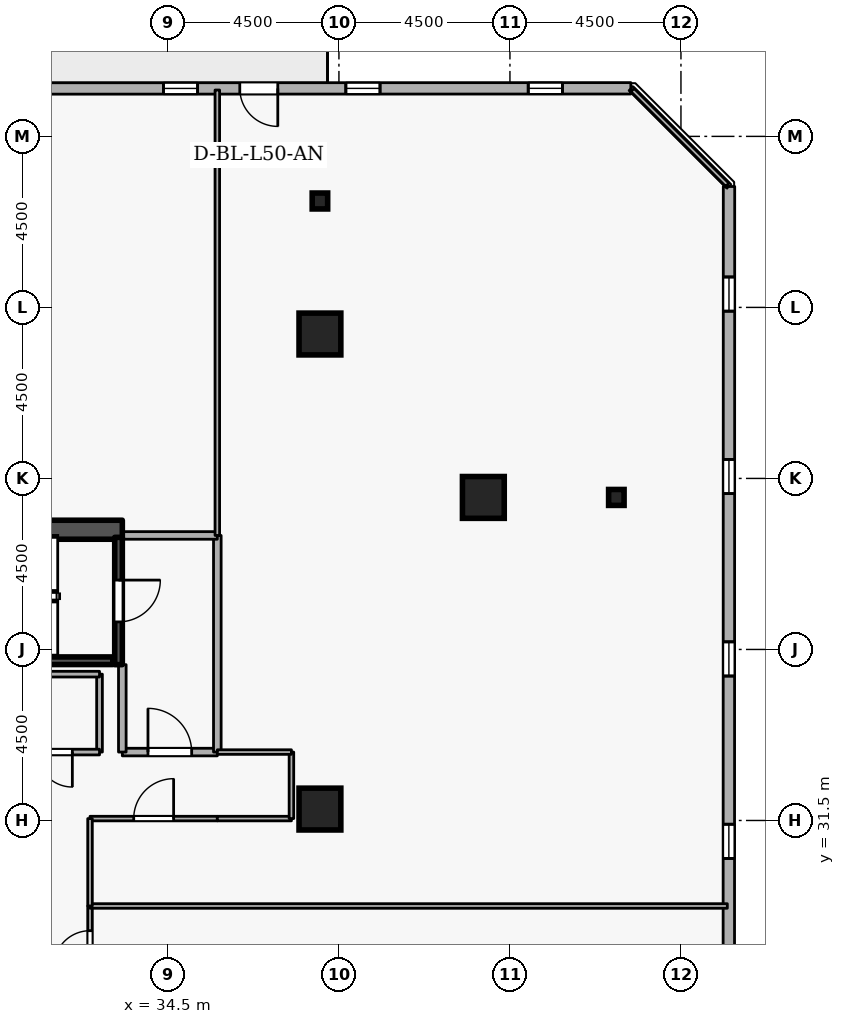
"""IFC4 building model, lengths in metres.
Left out: names, types, materials, properties, quantities, classifications, styles, units other than length and angle.
Written with IfcOpenShell. Run it as: python <this file> out.ifc"""

import sys

from ifc_helpers import new_model, si_unit, direction, frame, frame_2d, origin, origin_2d, place, context, subcontext, project, spatial, rectangle, i_section, extrude, element, fill, save


model = new_model("IFC4")
c1 = context("Model", 3, precision=1e-05, world=origin(), true_north=direction((0.0, 1.0)))
c2 = subcontext(c1, "Body", "Model", "MODEL_VIEW")
j1 = project(units=[si_unit("LENGTHUNIT", "METRE"), si_unit("PLANEANGLEUNIT", "RADIAN")], contexts=[c1])
p1 = place(None, origin())
s1 = spatial("IfcSite", under=j1, at=p1, CompositionType="ELEMENT")
p2 = place(p1, origin())
s2 = spatial("IfcBuilding", under=s1, at=p2, CompositionType="ELEMENT")
p3 = place(p2, frame((0.0, 0.0, 189.3)))
s3 = spatial("IfcBuildingStorey", under=s2, at=p3, CompositionType="ELEMENT", Elevation=189.3)
p4 = place(p3, frame((17.7, 39.15, 0.0), z_axis=(0.0, 0.0, 1.0), x_axis=(1.0, 0.0, 0.0)))
e1 = element("IfcWall", 1, at=p4, inside=s3, PredefinedType="SHEAR", context=c2, shape_type="SweptSolid", body=[
    extrude(rectangle(XDim=15.6, YDim=0.5, at=frame_2d((7.8, 0.0))), origin(), (0.0, 0.0, 1.0), 3.6),
])
for number, where, z_axis, x_axis in (
    (2, (42.8, 40.0, 0.0), (0.0, 0.0, 1.0), (1.0, 0.0, 0.0)),
    (3, (38.5, 44.3, 0.0), (0.0, 0.0, 1.0), (1.0, 0.0, 0.0)),
    (4, (38.5, 31.8, 0.0), (0.0, 0.0, 1.0), (1.0, 0.0, 0.0)),
):
    element("IfcColumn", number, at=place(p3, frame(where, z_axis=z_axis, x_axis=x_axis)), inside=s3, PredefinedType="COLUMN", context=c2, shape_type="SweptSolid", body=[
        extrude(rectangle(XDim=1.1, YDim=1.1, at=origin_2d()), origin(), (0.0, 0.0, 1.0), 3.6),
    ])
for number, where, z_axis, x_axis in (
    (5, (46.3, 40.0, 0.0), (0.0, 0.0, 1.0), (1.0, 0.0, 0.0)),
    (6, (38.5, 47.8, 0.0), (0.0, 0.0, 1.0), (1.0, 0.0, 0.0)),
):
    element("IfcColumn", number, at=place(p3, frame(where, z_axis=z_axis, x_axis=x_axis)), inside=s3, PredefinedType="COLUMN", context=c2, shape_type="SweptSolid", body=[
        extrude(i_section(OverallWidth=0.407, OverallDepth=0.419, WebThickness=0.031, FlangeThickness=0.049, FilletRadius=0.015, at=origin_2d()), origin(), (0.0, 0.0, 1.0), 3.6),
    ])
p5 = place(p3, frame((49.256, 14.301, 0.0), z_axis=(0.0, 0.0, 1.0), x_axis=(0.000244999128, 0.999999969988, 0.0)))
e7 = element("IfcWall", 7, at=p5, inside=s3, PredefinedType="STANDARD", context=c2, shape_type="SweptSolid", body=[
    extrude(rectangle(XDim=33.881, YDim=0.3, at=frame_2d((16.94, 0.0))), origin(), (0.0, 0.0, 1.0), 2.7),
])
p6 = place(p5, frame((1.8, 0.0, 0.72)))
e8 = element("IfcOpeningElement", 8, at=p6, cuts=e7, PredefinedType="OPENING", context=c2, shape_type="SweptSolid", body=[
    extrude(rectangle(XDim=0.9, YDim=1.75, at=frame_2d((0.45, 0.875))), frame((0.0, 0.16, 0.0), z_axis=(0.0, -1.0, 0.0), x_axis=(1.0, 0.0, 0.0)), (0.0, 0.0, 1.0), 0.32),
])
p7 = place(p5, frame((6.6, 0.0, 0.72)))
e9 = element("IfcOpeningElement", 9, at=p7, cuts=e7, PredefinedType="OPENING", context=c2, shape_type="SweptSolid", body=[
    extrude(rectangle(XDim=0.9, YDim=1.75, at=frame_2d((0.45, 0.875))), frame((0.0, 0.16, 0.0), z_axis=(0.0, -1.0, 0.0), x_axis=(1.0, 0.0, 0.0)), (0.0, 0.0, 1.0), 0.32),
])
p8 = place(p5, frame((11.4, 0.0, 0.72)))
e10 = element("IfcOpeningElement", 10, at=p8, cuts=e7, PredefinedType="OPENING", context=c2, shape_type="SweptSolid", body=[
    extrude(rectangle(XDim=0.9, YDim=1.75, at=frame_2d((0.45, 0.875))), frame((0.0, 0.16, 0.0), z_axis=(0.0, -1.0, 0.0), x_axis=(1.0, 0.0, 0.0)), (0.0, 0.0, 1.0), 0.32),
])
p9 = place(p5, frame((16.2, 0.0, 0.72)))
e11 = element("IfcOpeningElement", 11, at=p9, cuts=e7, PredefinedType="OPENING", context=c2, shape_type="SweptSolid", body=[
    extrude(rectangle(XDim=0.9, YDim=1.75, at=frame_2d((0.45, 0.875))), frame((0.0, 0.16, 0.0), z_axis=(0.0, -1.0, 0.0), x_axis=(1.0, 0.0, 0.0)), (0.0, 0.0, 1.0), 0.32),
])
p10 = place(p5, frame((21.0, 0.0, 0.72)))
e12 = element("IfcOpeningElement", 12, at=p10, cuts=e7, PredefinedType="OPENING", context=c2, shape_type="SweptSolid", body=[
    extrude(rectangle(XDim=0.9, YDim=1.75, at=frame_2d((0.45, 0.875))), frame((0.0, 0.16, 0.0), z_axis=(0.0, -1.0, 0.0), x_axis=(1.0, 0.0, 0.0)), (0.0, 0.0, 1.0), 0.32),
])
p11 = place(p5, frame((25.8, 0.0, 0.72)))
e13 = element("IfcOpeningElement", 13, at=p11, cuts=e7, PredefinedType="OPENING", context=c2, shape_type="SweptSolid", body=[
    extrude(rectangle(XDim=0.9, YDim=1.75, at=frame_2d((0.45, 0.875))), frame((0.0, 0.16, 0.0), z_axis=(0.0, -1.0, 0.0), x_axis=(1.0, 0.0, 0.0)), (0.0, 0.0, 1.0), 0.32),
])
p12 = place(p5, frame((30.6, 0.0, 0.72)))
e14 = element("IfcOpeningElement", 14, at=p12, cuts=e7, PredefinedType="OPENING", context=c2, shape_type="SweptSolid", body=[
    extrude(rectangle(XDim=0.9, YDim=1.75, at=frame_2d((0.45, 0.875))), frame((0.0, 0.16, 0.0), z_axis=(0.0, -1.0, 0.0), x_axis=(1.0, 0.0, 0.0)), (0.0, 0.0, 1.0), 0.32),
])
p13 = place(p3, frame((46.681, 50.765, 0.0), z_axis=(0.0, 0.0, 1.0), x_axis=(-0.999999969988, -0.000244999128, 0.0)))
e15 = element("IfcWall", 15, at=p13, inside=s3, PredefinedType="STANDARD", context=c2, shape_type="SweptSolid", body=[
    extrude(rectangle(XDim=33.881, YDim=0.3, at=frame_2d((16.94, 0.0))), origin(), (0.0, 0.0, 1.0), 2.7),
])
p14 = place(p13, frame((9.29, 0.0, 0.0)))
e16 = element("IfcOpeningElement", 16, at=p14, cuts=e15, PredefinedType="OPENING", context=c2, shape_type="SweptSolid", body=[
    extrude(rectangle(XDim=1.0, YDim=2.08, at=frame_2d((0.5, 1.04))), frame((0.0, 0.16, 0.0), z_axis=(0.0, -1.0, 0.0), x_axis=(1.0, 0.0, 0.0)), (0.0, 0.0, 1.0), 0.32),
])
p15 = place(p13, frame((1.8, 0.0, 0.72)))
e17 = element("IfcOpeningElement", 17, at=p15, cuts=e15, PredefinedType="OPENING", context=c2, shape_type="SweptSolid", body=[
    extrude(rectangle(XDim=0.9, YDim=1.75, at=frame_2d((0.45, 0.875))), frame((0.0, 0.16, 0.0), z_axis=(0.0, -1.0, 0.0), x_axis=(1.0, 0.0, 0.0)), (0.0, 0.0, 1.0), 0.32),
])
p16 = place(p13, frame((6.6, 0.0, 0.72)))
e18 = element("IfcOpeningElement", 18, at=p16, cuts=e15, PredefinedType="OPENING", context=c2, shape_type="SweptSolid", body=[
    extrude(rectangle(XDim=0.9, YDim=1.75, at=frame_2d((0.45, 0.875))), frame((0.0, 0.16, 0.0), z_axis=(0.0, -1.0, 0.0), x_axis=(1.0, 0.0, 0.0)), (0.0, 0.0, 1.0), 0.32),
])
p17 = place(p13, frame((11.4, 0.0, 0.72)))
e19 = element("IfcOpeningElement", 19, at=p17, cuts=e15, PredefinedType="OPENING", context=c2, shape_type="SweptSolid", body=[
    extrude(rectangle(XDim=0.9, YDim=1.75, at=frame_2d((0.45, 0.875))), frame((0.0, 0.16, 0.0), z_axis=(0.0, -1.0, 0.0), x_axis=(1.0, 0.0, 0.0)), (0.0, 0.0, 1.0), 0.32),
])
p18 = place(p13, frame((16.2, 0.0, 0.72)))
e20 = element("IfcOpeningElement", 20, at=p18, cuts=e15, PredefinedType="OPENING", context=c2, shape_type="SweptSolid", body=[
    extrude(rectangle(XDim=0.9, YDim=1.75, at=frame_2d((0.45, 0.875))), frame((0.0, 0.16, 0.0), z_axis=(0.0, -1.0, 0.0), x_axis=(1.0, 0.0, 0.0)), (0.0, 0.0, 1.0), 0.32),
])
p19 = place(p13, frame((21.0, 0.0, 0.72)))
e21 = element("IfcOpeningElement", 21, at=p19, cuts=e15, PredefinedType="OPENING", context=c2, shape_type="SweptSolid", body=[
    extrude(rectangle(XDim=0.9, YDim=1.75, at=frame_2d((0.45, 0.875))), frame((0.0, 0.16, 0.0), z_axis=(0.0, -1.0, 0.0), x_axis=(1.0, 0.0, 0.0)), (0.0, 0.0, 1.0), 0.32),
])
p20 = place(p13, frame((25.8, 0.0, 0.72)))
e22 = element("IfcOpeningElement", 22, at=p20, cuts=e15, PredefinedType="OPENING", context=c2, shape_type="SweptSolid", body=[
    extrude(rectangle(XDim=0.9, YDim=1.75, at=frame_2d((0.45, 0.875))), frame((0.0, 0.16, 0.0), z_axis=(0.0, -1.0, 0.0), x_axis=(1.0, 0.0, 0.0)), (0.0, 0.0, 1.0), 0.32),
])
p21 = place(p13, frame((30.6, 0.0, 0.72)))
e23 = element("IfcOpeningElement", 23, at=p21, cuts=e15, PredefinedType="OPENING", context=c2, shape_type="SweptSolid", body=[
    extrude(rectangle(XDim=0.9, YDim=1.75, at=frame_2d((0.45, 0.875))), frame((0.0, 0.16, 0.0), z_axis=(0.0, -1.0, 0.0), x_axis=(1.0, 0.0, 0.0)), (0.0, 0.0, 1.0), 0.32),
])
p22 = place(p3, frame((33.2, 38.95, 0.0), z_axis=(0.0, 0.0, 1.0), x_axis=(0.0, -1.0, 0.0)))
e24 = element("IfcWall", 24, at=p22, inside=s3, PredefinedType="SHEAR", context=c2, shape_type="SweptSolid", body=[
    extrude(rectangle(XDim=3.35, YDim=0.2, at=frame_2d((1.675, 0.0))), origin(), (0.0, 0.0, 1.0), 3.6),
])
p23 = place(p22, frame((1.125, 0.0, 0.0)))
e25 = element("IfcOpeningElement", 25, at=p23, cuts=e24, PredefinedType="OPENING", context=c2, shape_type="SweptSolid", body=[
    extrude(rectangle(XDim=1.1, YDim=2.1, at=frame_2d((0.55, 1.05))), frame((0.0, 0.11, 0.0), z_axis=(0.0, -1.0, 0.0), x_axis=(1.0, 0.0, 0.0)), (0.0, 0.0, 1.0), 0.22),
])
p24 = place(p3, frame((25.95, 35.703, 0.0), z_axis=(0.0, 0.0, 1.0), x_axis=(1.0, 0.0, 0.0)))
e26 = element("IfcWall", 26, at=p24, inside=s3, PredefinedType="SHEAR", context=c2, shape_type="SweptSolid", body=[
    extrude(rectangle(XDim=7.1, YDim=0.2, at=frame_2d((3.55, 0.0))), origin(), (0.0, 0.0, 1.0), 3.6),
])
p25 = place(p3, frame((33.3, 33.3, 0.0), z_axis=(0.0, 0.0, 1.0), x_axis=(1.0, 0.0, 0.0)))
e27 = element("IfcWall", 27, at=p25, inside=s3, PredefinedType="STANDARD", context=c2, shape_type="SweptSolid", body=[
    extrude(rectangle(XDim=2.5, YDim=0.2, at=frame_2d((1.25, 0.0))), origin(), (0.0, 0.0, 1.0), 3.34),
])
p26 = place(p25, frame((0.675, 0.0, 0.0)))
e28 = element("IfcOpeningElement", 28, at=p26, cuts=e27, PredefinedType="OPENING", context=c2, shape_type="SweptSolid", body=[
    extrude(rectangle(XDim=1.15, YDim=2.1, at=frame_2d((0.575, 1.05))), frame((0.0, 0.11, 0.0), z_axis=(0.0, -1.0, 0.0), x_axis=(1.0, 0.0, 0.0)), (0.0, 0.0, 1.0), 0.22),
])
p27 = place(p3, frame((35.8, 33.3, 0.0), z_axis=(0.0, 0.0, 1.0), x_axis=(0.0, 1.0, 0.0)))
e29 = element("IfcWall", 29, at=p27, inside=s3, PredefinedType="STANDARD", context=c2, shape_type="SweptSolid", body=[
    extrude(rectangle(XDim=5.7, YDim=0.2, at=frame_2d((2.85, 0.0))), origin(), (0.0, 0.0, 1.0), 3.34),
])
p28 = place(p3, frame((35.8, 39.0, 0.0), z_axis=(0.0, 0.0, 1.0), x_axis=(-1.0, 0.0, 0.0)))
e30 = element("IfcWall", 30, at=p28, inside=s3, PredefinedType="STANDARD", context=c2, shape_type="SweptSolid", body=[
    extrude(rectangle(XDim=2.5, YDim=0.2, at=frame_2d((1.25, 0.0))), origin(), (0.0, 0.0, 1.0), 3.34),
])
p29 = place(p3, frame((33.3, 35.6, 0.0), z_axis=(0.0, 0.0, 1.0), x_axis=(0.0, -1.0, 0.0)))
e31 = element("IfcWall", 31, at=p29, inside=s3, PredefinedType="STANDARD", context=c2, shape_type="SweptSolid", body=[
    extrude(rectangle(XDim=2.3, YDim=0.2, at=frame_2d((1.15, 0.0))), origin(), (0.0, 0.0, 1.0), 2.545),
])
p30 = place(p3, frame((32.7, 35.35, 0.0), z_axis=(0.0, 0.0, 1.0), x_axis=(0.0, -1.0, 0.0)))
e32 = element("IfcWall", 32, at=p30, inside=s3, PredefinedType="PARTITIONING", context=c2, shape_type="SweptSolid", body=[
    extrude(rectangle(XDim=2.05, YDim=0.15, at=frame_2d((1.025, 0.0))), origin(), (0.0, 0.0, 1.0), 2.545),
])
p31 = place(p3, frame((32.7, 33.3, 0.0), z_axis=(0.0, 0.0, 1.0), x_axis=(-1.0, 0.0, 0.0)))
e33 = element("IfcWall", 33, at=p31, inside=s3, PredefinedType="PARTITIONING", context=c2, shape_type="SweptSolid", body=[
    extrude(rectangle(XDim=2.35, YDim=0.15, at=frame_2d((1.175, 0.0))), origin(), (0.0, 0.0, 1.0), 3.34),
])
p32 = place(p31, frame((0.715, 0.0, 0.0)))
e34 = element("IfcOpeningElement", 34, at=p32, cuts=e33, PredefinedType="OPENING", context=c2, shape_type="SweptSolid", body=[
    extrude(rectangle(XDim=0.92, YDim=2.08, at=frame_2d((0.46, 1.04))), frame((0.0, 0.085, 0.0), z_axis=(0.0, -1.0, 0.0), x_axis=(1.0, 0.0, 0.0)), (0.0, 0.0, 1.0), 0.17),
])
p33 = place(p3, frame((30.35, 35.35, 0.0), z_axis=(0.0, 0.0, 1.0), x_axis=(1.0, 0.0, 0.0)))
e35 = element("IfcWall", 35, at=p33, inside=s3, PredefinedType="PARTITIONING", context=c2, shape_type="SweptSolid", body=[
    extrude(rectangle(XDim=2.35, YDim=0.15, at=frame_2d((1.175, 0.0))), origin(), (0.0, 0.0, 1.0), 3.34),
])
p34 = place(p3, frame((32.45, 27.0, 0.0), z_axis=(0.0, 0.0, 1.0), x_axis=(0.0, 1.0, 0.0)))
e36 = element("IfcWall", 36, at=p34, inside=s3, PredefinedType="PARTITIONING", context=c2, shape_type="SweptSolid", body=[
    extrude(rectangle(XDim=2.25, YDim=0.12, at=frame_2d((1.125, 0.0))), origin(), (0.0, 0.0, 1.0), 3.34),
])
p35 = place(p34, frame((0.65, 0.0, 0.0)))
e37 = element("IfcOpeningElement", 37, at=p35, cuts=e36, PredefinedType="OPENING", context=c2, shape_type="SweptSolid", body=[
    extrude(rectangle(XDim=0.95, YDim=2.1, at=frame_2d((0.475, 1.05))), frame((0.0, 0.07, 0.0), z_axis=(0.0, -1.0, 0.0), x_axis=(1.0, 0.0, 0.0)), (0.0, 0.0, 1.0), 0.14),
])
p36 = place(p3, frame((32.45, 29.25, 0.0), z_axis=(0.0, 0.0, 1.0), x_axis=(1.0, 0.0, 0.0)))
e38 = element("IfcWall", 38, at=p36, inside=s3, PredefinedType="PARTITIONING", context=c2, shape_type="SweptSolid", body=[
    extrude(rectangle(XDim=16.77, YDim=0.12, at=frame_2d((8.385, 0.0))), origin(), (0.0, 0.0, 1.0), 3.34),
])
p37 = place(p3, frame((32.45, 31.55, 0.0), z_axis=(0.0, 0.0, 1.0), x_axis=(1.0, 0.0, 0.0)))
e39 = element("IfcWall", 39, at=p37, inside=s3, PredefinedType="PARTITIONING", context=c2, shape_type="SweptSolid", body=[
    extrude(rectangle(XDim=3.35, YDim=0.12, at=frame_2d((1.675, 0.0))), origin(), (0.0, 0.0, 1.0), 3.34),
])
p38 = place(p37, frame((1.15, 0.0, 0.0)))
e40 = element("IfcOpeningElement", 40, at=p38, cuts=e39, PredefinedType="OPENING", context=c2, shape_type="SweptSolid", body=[
    extrude(rectangle(XDim=1.05, YDim=2.1, at=frame_2d((0.525, 1.05))), frame((0.0, 0.07, 0.0), z_axis=(0.0, -1.0, 0.0), x_axis=(1.0, 0.0, 0.0)), (0.0, 0.0, 1.0), 0.14),
])
p39 = place(p3, frame((35.8, 31.55, 0.0), z_axis=(0.0, 0.0, 1.0), x_axis=(1.0, 0.0, 0.0)))
e41 = element("IfcWall", 41, at=p39, inside=s3, PredefinedType="PARTITIONING", context=c2, shape_type="SweptSolid", body=[
    extrude(rectangle(XDim=1.95, YDim=0.12, at=frame_2d((0.975, 0.0))), origin(), (0.0, 0.0, 1.0), 3.34),
])
p40 = place(p3, frame((37.75, 31.55, 0.0), z_axis=(0.0, 0.0, 1.0), x_axis=(0.0, 1.0, 0.0)))
e42 = element("IfcWall", 42, at=p40, inside=s3, PredefinedType="PARTITIONING", context=c2, shape_type="SweptSolid", body=[
    extrude(rectangle(XDim=1.75, YDim=0.12, at=frame_2d((0.875, 0.0))), origin(), (0.0, 0.0, 1.0), 3.34),
])
p41 = place(p3, frame((37.75, 33.3, 0.0), z_axis=(0.0, 0.0, 1.0), x_axis=(-1.0, 0.0, 0.0)))
e43 = element("IfcWall", 43, at=p41, inside=s3, PredefinedType="PARTITIONING", context=c2, shape_type="SweptSolid", body=[
    extrude(rectangle(XDim=1.95, YDim=0.12, at=frame_2d((0.975, 0.0))), origin(), (0.0, 0.0, 1.0), 3.34),
])
p42 = place(p3, frame((35.8, 39.0, 0.0), z_axis=(0.0, 0.0, 1.0), x_axis=(0.0, 1.0, 0.0)))
e44 = element("IfcWall", 44, at=p42, inside=s3, PredefinedType="PARTITIONING", context=c2, shape_type="SweptSolid", body=[
    extrude(rectangle(XDim=11.72, YDim=0.12, at=frame_2d((5.86, 0.0))), origin(), (0.0, 0.0, 1.0), 3.34),
])
p43 = place(p3, frame((46.725, 50.72, 0.0), z_axis=(0.0, 0.0, 1.0), x_axis=(0.707106781187, -0.707106781187, 0.0)))
e45 = element("IfcWall", 45, at=p43, inside=s3, PredefinedType="PARTITIONING", context=c2, shape_type="SweptSolid", body=[
    extrude(rectangle(XDim=3.528, YDim=0.12, at=frame_2d((1.764, 0.0))), origin(), (0.0, 0.0, 1.0), 3.34),
])
p44 = place(p3, frame((32.45, 29.25, 0.0), z_axis=(0.0, 0.0, 1.0), x_axis=(0.0, 1.0, 0.0)))
e46 = element("IfcWall", 46, at=p44, inside=s3, PredefinedType="PARTITIONING", context=c2, shape_type="SweptSolid", body=[
    extrude(rectangle(XDim=2.3, YDim=0.12, at=frame_2d((1.15, 0.0))), origin(), (0.0, 0.0, 1.0), 3.34),
])
p45 = place(p9, origin())
e47 = element("IfcWindow", 47, at=p45, inside=s3, PartitioningType="SINGLE_PANEL", PredefinedType="WINDOW", context=c2, shape_type="SweptSolid", body=[
    extrude(rectangle(XDim=0.9, YDim=1.75, at=frame_2d((0.45, 0.875))), frame((0.0, 0.03, 0.0), z_axis=(0.0, -1.0, 0.0), x_axis=(1.0, 0.0, 0.0)), (0.0, 0.0, 1.0), 0.06),
])
fill(e11, e47)
p46 = place(p10, origin())
e48 = element("IfcWindow", 48, at=p46, inside=s3, PartitioningType="SINGLE_PANEL", PredefinedType="WINDOW", context=c2, shape_type="SweptSolid", body=[
    extrude(rectangle(XDim=0.9, YDim=1.75, at=frame_2d((0.45, 0.875))), frame((0.0, 0.03, 0.0), z_axis=(0.0, -1.0, 0.0), x_axis=(1.0, 0.0, 0.0)), (0.0, 0.0, 1.0), 0.06),
])
fill(e12, e48)
p47 = place(p11, origin())
e49 = element("IfcWindow", 49, at=p47, inside=s3, PartitioningType="SINGLE_PANEL", PredefinedType="WINDOW", context=c2, shape_type="SweptSolid", body=[
    extrude(rectangle(XDim=0.9, YDim=1.75, at=frame_2d((0.45, 0.875))), frame((0.0, 0.03, 0.0), z_axis=(0.0, -1.0, 0.0), x_axis=(1.0, 0.0, 0.0)), (0.0, 0.0, 1.0), 0.06),
])
fill(e13, e49)
p48 = place(p12, origin())
e50 = element("IfcWindow", 50, at=p48, inside=s3, PartitioningType="SINGLE_PANEL", PredefinedType="WINDOW", context=c2, shape_type="SweptSolid", body=[
    extrude(rectangle(XDim=0.9, YDim=1.75, at=frame_2d((0.45, 0.875))), frame((0.0, 0.03, 0.0), z_axis=(0.0, -1.0, 0.0), x_axis=(1.0, 0.0, 0.0)), (0.0, 0.0, 1.0), 0.06),
])
fill(e14, e50)
p49 = place(p14, origin())
e51 = element("IfcDoor", 51, at=p49, inside=s3, OperationType="SINGLE_SWING_LEFT", PredefinedType="DOOR", context=c2, shape_type="SweptSolid", body=[
    extrude(rectangle(XDim=1.0, YDim=2.08, at=frame_2d((0.5, 1.04))), frame((0.0, 0.025, 0.0), z_axis=(0.0, -1.0, 0.0), x_axis=(1.0, 0.0, 0.0)), (0.0, 0.0, 1.0), 0.05),
])
fill(e16, e51)
p50 = place(p15, origin())
e52 = element("IfcWindow", 52, at=p50, inside=s3, PartitioningType="SINGLE_PANEL", PredefinedType="WINDOW", context=c2, shape_type="SweptSolid", body=[
    extrude(rectangle(XDim=0.9, YDim=1.75, at=frame_2d((0.45, 0.875))), frame((0.0, 0.03, 0.0), z_axis=(0.0, -1.0, 0.0), x_axis=(1.0, 0.0, 0.0)), (0.0, 0.0, 1.0), 0.06),
])
fill(e17, e52)
p51 = place(p16, origin())
e53 = element("IfcWindow", 53, at=p51, inside=s3, PartitioningType="SINGLE_PANEL", PredefinedType="WINDOW", context=c2, shape_type="SweptSolid", body=[
    extrude(rectangle(XDim=0.9, YDim=1.75, at=frame_2d((0.45, 0.875))), frame((0.0, 0.03, 0.0), z_axis=(0.0, -1.0, 0.0), x_axis=(1.0, 0.0, 0.0)), (0.0, 0.0, 1.0), 0.06),
])
fill(e18, e53)
p52 = place(p17, origin())
e54 = element("IfcWindow", 54, at=p52, inside=s3, PartitioningType="SINGLE_PANEL", PredefinedType="WINDOW", context=c2, shape_type="SweptSolid", body=[
    extrude(rectangle(XDim=0.9, YDim=1.75, at=frame_2d((0.45, 0.875))), frame((0.0, 0.03, 0.0), z_axis=(0.0, -1.0, 0.0), x_axis=(1.0, 0.0, 0.0)), (0.0, 0.0, 1.0), 0.06),
])
fill(e19, e54)
p53 = place(p23, origin())
e55 = element("IfcDoor", 55, at=p53, inside=s3, OperationType="SINGLE_SWING_LEFT", PredefinedType="DOOR", context=c2, shape_type="SweptSolid", body=[
    extrude(rectangle(XDim=1.1, YDim=2.1, at=frame_2d((0.55, 1.05))), frame((0.0, 0.025, 0.0), z_axis=(0.0, -1.0, 0.0), x_axis=(1.0, 0.0, 0.0)), (0.0, 0.0, 1.0), 0.05),
])
fill(e25, e55)
p54 = place(p26, origin())
e56 = element("IfcDoor", 56, at=p54, inside=s3, OperationType="SINGLE_SWING_LEFT", PredefinedType="DOOR", context=c2, shape_type="SweptSolid", body=[
    extrude(rectangle(XDim=1.15, YDim=2.1, at=frame_2d((0.575, 1.05))), frame((0.0, 0.025, 0.0), z_axis=(0.0, -1.0, 0.0), x_axis=(1.0, 0.0, 0.0)), (0.0, 0.0, 1.0), 0.05),
])
fill(e28, e56)
p55 = place(p32, origin())
e57 = element("IfcDoor", 57, at=p55, inside=s3, OperationType="SINGLE_SWING_LEFT", PredefinedType="DOOR", context=c2, shape_type="SweptSolid", body=[
    extrude(rectangle(XDim=0.92, YDim=2.08, at=frame_2d((0.46, 1.04))), frame((0.0, 0.025, 0.0), z_axis=(0.0, -1.0, 0.0), x_axis=(1.0, 0.0, 0.0)), (0.0, 0.0, 1.0), 0.05),
])
fill(e34, e57)
p56 = place(p35, origin())
e58 = element("IfcDoor", 58, at=p56, inside=s3, OperationType="SINGLE_SWING_LEFT", PredefinedType="DOOR", context=c2, shape_type="SweptSolid", body=[
    extrude(rectangle(XDim=0.95, YDim=2.1, at=frame_2d((0.475, 1.05))), frame((0.0, 0.025, 0.0), z_axis=(0.0, -1.0, 0.0), x_axis=(1.0, 0.0, 0.0)), (0.0, 0.0, 1.0), 0.05),
])
fill(e37, e58)
p57 = place(p38, origin())
e59 = element("IfcDoor", 59, at=p57, inside=s3, OperationType="SINGLE_SWING_RIGHT", PredefinedType="DOOR", context=c2, shape_type="SweptSolid", body=[
    extrude(rectangle(XDim=1.05, YDim=2.1, at=frame_2d((0.525, 1.05))), frame((0.0, 0.025, 0.0), z_axis=(0.0, -1.0, 0.0), x_axis=(1.0, 0.0, 0.0)), (0.0, 0.0, 1.0), 0.05),
])
fill(e40, e59)
save(model, sys.argv[1])
